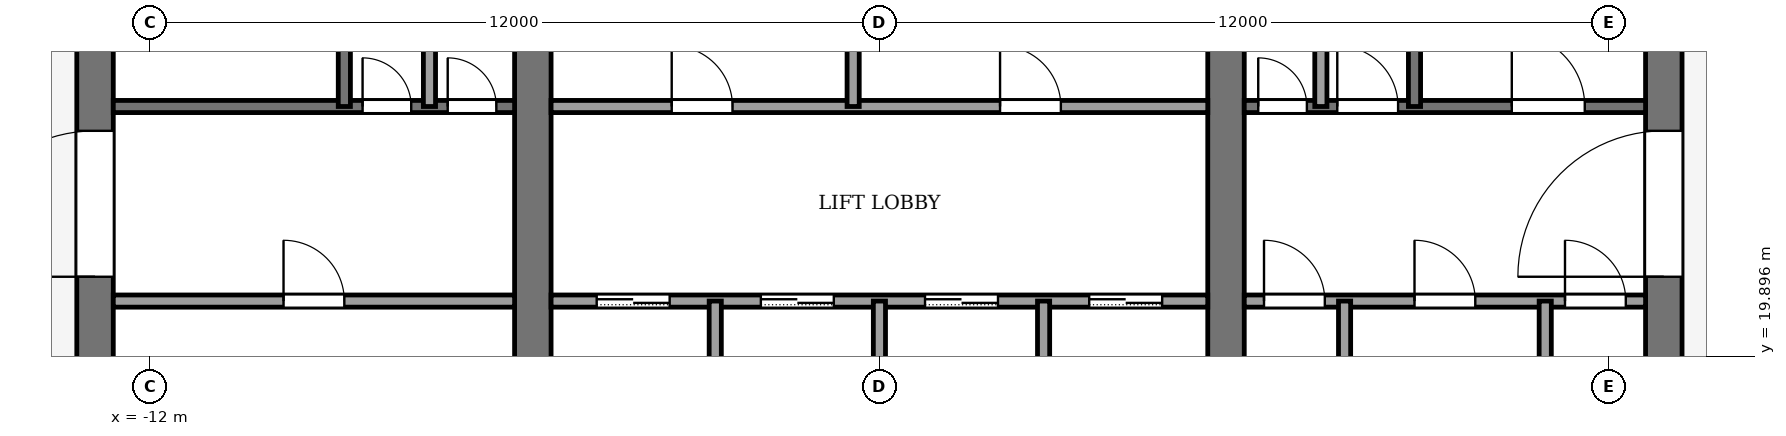
"""IFC4 building model, lengths in metres.
Left out: names, types, materials, properties, quantities, classifications, styles, units other than length and angle.
Written with IfcOpenShell. Run it as: python <this file> out.ifc"""

import sys

from ifc_helpers import new_model, si_unit, direction, frame, frame_2d, origin, place, context, subcontext, project, spatial, rectangle, extrude, element, fill, save


model = new_model("IFC4")
c1 = context("Model", 3, precision=1e-05, world=origin(), true_north=direction((0.0, 1.0)))
c2 = subcontext(c1, "Body", "Model", "MODEL_VIEW")
j1 = project(units=[si_unit("LENGTHUNIT", "METRE"), si_unit("PLANEANGLEUNIT", "RADIAN")], contexts=[c1])
p1 = place(None, origin())
s1 = spatial("IfcSite", under=j1, at=p1, CompositionType="ELEMENT")
p2 = place(p1, origin())
s2 = spatial("IfcBuilding", under=s1, at=p2, CompositionType="ELEMENT")
p3 = place(p2, frame((0.0, 0.0, 326.0)))
s3 = spatial("IfcBuildingStorey", under=s2, at=p3, CompositionType="ELEMENT", Elevation=326.0)
p4 = place(p3, frame((-12.9, 18.4, -0.13), z_axis=(0.0, 0.0, 1.0), x_axis=(0.0, 1.0, 0.0)))
e1 = element("IfcWall", 1, at=p4, inside=s3, PredefinedType="SHEAR", context=c2, shape_type="SweptSolid", body=[
    extrude(rectangle(XDim=19.2, YDim=0.6, at=frame_2d((9.6, 0.0))), origin(), (0.0, 0.0, 1.0), 4.0),
])
p5 = place(p4, frame((2.8, 0.0, 0.13)))
e2 = element("IfcOpeningElement", 2, at=p5, cuts=e1, PredefinedType="OPENING", context=c2, shape_type="SweptSolid", body=[
    extrude(rectangle(XDim=2.4, YDim=2.4, at=frame_2d((1.2, 1.2))), frame((0.0, 0.31, 0.0), z_axis=(0.0, -1.0, 0.0), x_axis=(1.0, 0.0, 0.0)), (0.0, 0.0, 1.0), 0.62),
])
p6 = place(p4, frame((13.4, 0.0, 0.13)))
e3 = element("IfcOpeningElement", 3, at=p6, cuts=e1, PredefinedType="OPENING", context=c2, shape_type="SweptSolid", body=[
    extrude(rectangle(XDim=1.4, YDim=2.2, at=frame_2d((0.7, 1.1))), frame((0.0, 0.31, 0.0), z_axis=(0.0, -1.0, 0.0), x_axis=(1.0, 0.0, 0.0)), (0.0, 0.0, 1.0), 0.62),
])
p7 = place(p3, frame((12.9, 18.4, -0.13), z_axis=(0.0, 0.0, 1.0), x_axis=(0.0, 1.0, 0.0)))
e4 = element("IfcWall", 4, at=p7, inside=s3, PredefinedType="SHEAR", context=c2, shape_type="SweptSolid", body=[
    extrude(rectangle(XDim=19.2, YDim=0.6, at=frame_2d((9.6, 0.0))), origin(), (0.0, 0.0, 1.0), 4.0),
])
p8 = place(p7, frame((2.8, 0.0, 0.13)))
e5 = element("IfcOpeningElement", 5, at=p8, cuts=e4, PredefinedType="OPENING", context=c2, shape_type="SweptSolid", body=[
    extrude(rectangle(XDim=2.4, YDim=2.4, at=frame_2d((1.2, 1.2))), frame((0.0, 0.31, 0.0), z_axis=(0.0, -1.0, 0.0), x_axis=(1.0, 0.0, 0.0)), (0.0, 0.0, 1.0), 0.62),
])
p9 = place(p7, frame((13.3, 0.0, 0.13)))
e6 = element("IfcOpeningElement", 6, at=p9, cuts=e4, PredefinedType="OPENING", context=c2, shape_type="SweptSolid", body=[
    extrude(rectangle(XDim=2.4, YDim=2.4, at=frame_2d((1.2, 1.2))), frame((0.0, 0.31, 0.0), z_axis=(0.0, -1.0, 0.0), x_axis=(1.0, 0.0, 0.0)), (0.0, 0.0, 1.0), 0.62),
])
p10 = place(p3, frame((-5.7, 18.4, -0.13), z_axis=(0.0, 0.0, 1.0), x_axis=(0.0, 1.0, 0.0)))
e7 = element("IfcWall", 7, at=p10, inside=s3, PredefinedType="SHEAR", context=c2, shape_type="SweptSolid", body=[
    extrude(rectangle(XDim=19.2, YDim=0.6, at=frame_2d((9.6, 0.0))), origin(), (0.0, 0.0, 1.0), 4.0),
])
p11 = place(p10, frame((8.35, 0.0, 0.13)))
e8 = element("IfcOpeningElement", 8, at=p11, cuts=e7, PredefinedType="OPENING", context=c2, shape_type="SweptSolid", body=[
    extrude(rectangle(XDim=0.9, YDim=2.1, at=frame_2d((0.45, 1.05))), frame((0.0, 0.31, 0.0), z_axis=(0.0, -1.0, 0.0), x_axis=(1.0, 0.0, 0.0)), (0.0, 0.0, 1.0), 0.62),
])
p12 = place(p3, frame((5.7, 18.4, -0.13), z_axis=(0.0, 0.0, 1.0), x_axis=(0.0, 1.0, 0.0)))
e9 = element("IfcWall", 9, at=p12, inside=s3, PredefinedType="SHEAR", context=c2, shape_type="SweptSolid", body=[
    extrude(rectangle(XDim=19.2, YDim=0.6, at=frame_2d((9.6, 0.0))), origin(), (0.0, 0.0, 1.0), 4.0),
])
p13 = place(p12, frame((13.3, 0.0, 0.13)))
e10 = element("IfcOpeningElement", 10, at=p13, cuts=e9, PredefinedType="OPENING", context=c2, shape_type="SweptSolid", body=[
    extrude(rectangle(XDim=2.4, YDim=2.4, at=frame_2d((1.2, 1.2))), frame((0.0, 0.31, 0.0), z_axis=(0.0, -1.0, 0.0), x_axis=(1.0, 0.0, 0.0)), (0.0, 0.0, 1.0), 0.62),
])
p14 = place(p3, frame((-12.6, 20.8, 0.0), z_axis=(0.0, 0.0, 1.0), x_axis=(1.0, 0.0, 0.0)))
e11 = element("IfcWall", 11, at=p14, inside=s3, PredefinedType="PARTITIONING", context=c2, shape_type="SweptSolid", body=[
    extrude(rectangle(XDim=6.6, YDim=0.2, at=frame_2d((3.3, 0.0))), origin(), (0.0, 0.0, 1.0), 3.87),
])
p15 = place(p14, frame((2.8, 0.0, 0.0)))
e12 = element("IfcOpeningElement", 12, at=p15, cuts=e11, PredefinedType="OPENING", context=c2, shape_type="SweptSolid", body=[
    extrude(rectangle(XDim=1.0, YDim=2.1, at=frame_2d((0.5, 1.05))), frame((0.0, 0.11, 0.0), z_axis=(0.0, -1.0, 0.0), x_axis=(1.0, 0.0, 0.0)), (0.0, 0.0, 1.0), 0.22),
])
p16 = place(p3, frame((-5.4, 20.8, 0.0), z_axis=(0.0, 0.0, 1.0), x_axis=(1.0, 0.0, 0.0)))
e13 = element("IfcWall", 13, at=p16, inside=s3, PredefinedType="PARTITIONING", context=c2, shape_type="SweptSolid", body=[
    extrude(rectangle(XDim=10.8, YDim=0.2, at=frame_2d((5.4, 0.0))), origin(), (0.0, 0.0, 1.0), 3.87),
])
p17 = place(p16, frame((0.75, 0.0, 0.0)))
e14 = element("IfcOpeningElement", 14, at=p17, cuts=e13, PredefinedType="OPENING", context=c2, shape_type="SweptSolid", body=[
    extrude(rectangle(XDim=1.2, YDim=2.2, at=frame_2d((0.6, 1.1))), frame((0.0, 0.11, 0.0), z_axis=(0.0, -1.0, 0.0), x_axis=(1.0, 0.0, 0.0)), (0.0, 0.0, 1.0), 0.22),
])
p18 = place(p16, frame((3.45, 0.0, 0.0)))
e15 = element("IfcOpeningElement", 15, at=p18, cuts=e13, PredefinedType="OPENING", context=c2, shape_type="SweptSolid", body=[
    extrude(rectangle(XDim=1.2, YDim=2.2, at=frame_2d((0.6, 1.1))), frame((0.0, 0.11, 0.0), z_axis=(0.0, -1.0, 0.0), x_axis=(1.0, 0.0, 0.0)), (0.0, 0.0, 1.0), 0.22),
])
p19 = place(p16, frame((6.15, 0.0, 0.0)))
e16 = element("IfcOpeningElement", 16, at=p19, cuts=e13, PredefinedType="OPENING", context=c2, shape_type="SweptSolid", body=[
    extrude(rectangle(XDim=1.2, YDim=2.2, at=frame_2d((0.6, 1.1))), frame((0.0, 0.11, 0.0), z_axis=(0.0, -1.0, 0.0), x_axis=(1.0, 0.0, 0.0)), (0.0, 0.0, 1.0), 0.22),
])
p20 = place(p16, frame((8.85, 0.0, 0.0)))
e17 = element("IfcOpeningElement", 17, at=p20, cuts=e13, PredefinedType="OPENING", context=c2, shape_type="SweptSolid", body=[
    extrude(rectangle(XDim=1.2, YDim=2.2, at=frame_2d((0.6, 1.1))), frame((0.0, 0.11, 0.0), z_axis=(0.0, -1.0, 0.0), x_axis=(1.0, 0.0, 0.0)), (0.0, 0.0, 1.0), 0.22),
])
p21 = place(p3, frame((6.0, 20.8, 0.0), z_axis=(0.0, 0.0, 1.0), x_axis=(1.0, 0.0, 0.0)))
e18 = element("IfcWall", 18, at=p21, inside=s3, PredefinedType="PARTITIONING", context=c2, shape_type="SweptSolid", body=[
    extrude(rectangle(XDim=6.6, YDim=0.2, at=frame_2d((3.3, 0.0))), origin(), (0.0, 0.0, 1.0), 3.87),
])
p22 = place(p21, frame((0.325, 0.0, 0.0)))
e19 = element("IfcOpeningElement", 19, at=p22, cuts=e18, PredefinedType="OPENING", context=c2, shape_type="SweptSolid", body=[
    extrude(rectangle(XDim=1.0, YDim=2.1, at=frame_2d((0.5, 1.05))), frame((0.0, 0.11, 0.0), z_axis=(0.0, -1.0, 0.0), x_axis=(1.0, 0.0, 0.0)), (0.0, 0.0, 1.0), 0.22),
])
p23 = place(p21, frame((2.8, 0.0, 0.0)))
e20 = element("IfcOpeningElement", 20, at=p23, cuts=e18, PredefinedType="OPENING", context=c2, shape_type="SweptSolid", body=[
    extrude(rectangle(XDim=1.0, YDim=2.1, at=frame_2d((0.5, 1.05))), frame((0.0, 0.11, 0.0), z_axis=(0.0, -1.0, 0.0), x_axis=(1.0, 0.0, 0.0)), (0.0, 0.0, 1.0), 0.22),
])
p24 = place(p21, frame((5.275, 0.0, 0.0)))
e21 = element("IfcOpeningElement", 21, at=p24, cuts=e18, PredefinedType="OPENING", context=c2, shape_type="SweptSolid", body=[
    extrude(rectangle(XDim=1.0, YDim=2.1, at=frame_2d((0.5, 1.05))), frame((0.0, 0.11, 0.0), z_axis=(0.0, -1.0, 0.0), x_axis=(1.0, 0.0, 0.0)), (0.0, 0.0, 1.0), 0.22),
])
p25 = place(p3, frame((-12.6, 24.0, 0.0), z_axis=(0.0, 0.0, 1.0), x_axis=(1.0, 0.0, 0.0)))
e22 = element("IfcWall", 22, at=p25, inside=s3, PredefinedType="PARTITIONING", context=c2, shape_type="SweptSolid", body=[
    extrude(rectangle(XDim=6.6, YDim=0.2, at=frame_2d((3.3, 0.0))), origin(), (0.0, 0.0, 1.0), 3.87),
])
p26 = place(p25, frame((4.1, 0.0, 0.0)))
e23 = element("IfcOpeningElement", 23, at=p26, cuts=e22, PredefinedType="OPENING", context=c2, shape_type="SweptSolid", body=[
    extrude(rectangle(XDim=0.8, YDim=2.1, at=frame_2d((0.4, 1.05))), frame((0.0, 0.11, 0.0), z_axis=(0.0, -1.0, 0.0), x_axis=(1.0, 0.0, 0.0)), (0.0, 0.0, 1.0), 0.22),
])
p27 = place(p25, frame((5.5, 0.0, 0.0)))
e24 = element("IfcOpeningElement", 24, at=p27, cuts=e22, PredefinedType="OPENING", context=c2, shape_type="SweptSolid", body=[
    extrude(rectangle(XDim=0.8, YDim=2.1, at=frame_2d((0.4, 1.05))), frame((0.0, 0.11, 0.0), z_axis=(0.0, -1.0, 0.0), x_axis=(1.0, 0.0, 0.0)), (0.0, 0.0, 1.0), 0.22),
])
p28 = place(p3, frame((-5.4, 24.0, 0.0), z_axis=(0.0, 0.0, 1.0), x_axis=(1.0, 0.0, 0.0)))
e25 = element("IfcWall", 25, at=p28, inside=s3, PredefinedType="PARTITIONING", context=c2, shape_type="SweptSolid", body=[
    extrude(rectangle(XDim=10.8, YDim=0.2, at=frame_2d((5.4, 0.0))), origin(), (0.0, 0.0, 1.0), 3.87),
])
p29 = place(p28, frame((1.984, 0.0, 0.0)))
e26 = element("IfcOpeningElement", 26, at=p29, cuts=e25, PredefinedType="OPENING", context=c2, shape_type="SweptSolid", body=[
    extrude(rectangle(XDim=1.0, YDim=2.1, at=frame_2d((0.5, 1.05))), frame((0.0, 0.11, 0.0), z_axis=(0.0, -1.0, 0.0), x_axis=(1.0, 0.0, 0.0)), (0.0, 0.0, 1.0), 0.22),
])
p30 = place(p28, frame((7.384, 0.0, 0.0)))
e27 = element("IfcOpeningElement", 27, at=p30, cuts=e25, PredefinedType="OPENING", context=c2, shape_type="SweptSolid", body=[
    extrude(rectangle(XDim=1.0, YDim=2.1, at=frame_2d((0.5, 1.05))), frame((0.0, 0.11, 0.0), z_axis=(0.0, -1.0, 0.0), x_axis=(1.0, 0.0, 0.0)), (0.0, 0.0, 1.0), 0.22),
])
p31 = place(p3, frame((6.0, 24.0, 0.0), z_axis=(0.0, 0.0, 1.0), x_axis=(1.0, 0.0, 0.0)))
e28 = element("IfcWall", 28, at=p31, inside=s3, PredefinedType="PARTITIONING", context=c2, shape_type="SweptSolid", body=[
    extrude(rectangle(XDim=6.6, YDim=0.2, at=frame_2d((3.3, 0.0))), origin(), (0.0, 0.0, 1.0), 3.87),
])
p32 = place(p31, frame((0.23, 0.0, 0.0)))
e29 = element("IfcOpeningElement", 29, at=p32, cuts=e28, PredefinedType="OPENING", context=c2, shape_type="SweptSolid", body=[
    extrude(rectangle(XDim=0.8, YDim=2.1, at=frame_2d((0.4, 1.05))), frame((0.0, 0.11, 0.0), z_axis=(0.0, -1.0, 0.0), x_axis=(1.0, 0.0, 0.0)), (0.0, 0.0, 1.0), 0.22),
])
p33 = place(p31, frame((1.53, 0.0, 0.0)))
e30 = element("IfcOpeningElement", 30, at=p33, cuts=e28, PredefinedType="OPENING", context=c2, shape_type="SweptSolid", body=[
    extrude(rectangle(XDim=1.0, YDim=2.1, at=frame_2d((0.5, 1.05))), frame((0.0, 0.11, 0.0), z_axis=(0.0, -1.0, 0.0), x_axis=(1.0, 0.0, 0.0)), (0.0, 0.0, 1.0), 0.22),
])
p34 = place(p31, frame((4.4, 0.0, 0.0)))
e31 = element("IfcOpeningElement", 31, at=p34, cuts=e28, PredefinedType="OPENING", context=c2, shape_type="SweptSolid", body=[
    extrude(rectangle(XDim=1.2, YDim=2.2, at=frame_2d((0.6, 1.1))), frame((0.0, 0.11, 0.0), z_axis=(0.0, -1.0, 0.0), x_axis=(1.0, 0.0, 0.0)), (0.0, 0.0, 1.0), 0.22),
])
for number, where, z_axis, x_axis in (
    (32, (-8.8, 24.0, 0.0), (0.0, 0.0, 1.0), (0.0, 1.0, 0.0)),
    (33, (-7.4, 24.0, 0.0), (0.0, 0.0, 1.0), (0.0, 1.0, 0.0)),
):
    element("IfcWall", number, at=place(p3, frame(where, z_axis=z_axis, x_axis=x_axis)), inside=s3, PredefinedType="PARTITIONING", context=c2, shape_type="SweptSolid", body=[
        extrude(rectangle(XDim=7.4, YDim=0.2, at=frame_2d((3.7, 0.0))), origin(), (0.0, 0.0, 1.0), 3.87),
    ])
p35 = place(p3, frame((-2.7, 18.4, 0.0), z_axis=(0.0, 0.0, 1.0), x_axis=(0.0, 1.0, 0.0)))
e34 = element("IfcWall", 34, at=p35, inside=s3, PredefinedType="PARTITIONING", context=c2, shape_type="SweptSolid", body=[
    extrude(rectangle(XDim=2.4, YDim=0.2, at=frame_2d((1.2, 0.0))), origin(), (0.0, 0.0, 1.0), 3.87),
])
p36 = place(p3, frame((-0.432, 24.0, 0.0), z_axis=(0.0, 0.0, 1.0), x_axis=(0.0, 1.0, 0.0)))
e35 = element("IfcWall", 35, at=p36, inside=s3, PredefinedType="PARTITIONING", context=c2, shape_type="SweptSolid", body=[
    extrude(rectangle(XDim=2.4, YDim=0.2, at=frame_2d((1.2, 0.0))), origin(), (0.0, 0.0, 1.0), 3.87),
])
for number, where, z_axis, x_axis in (
    (36, (0.0, 18.4, 0.0), (0.0, 0.0, 1.0), (0.0, 1.0, 0.0)),
    (37, (2.7, 18.4, 0.0), (0.0, 0.0, 1.0), (0.0, 1.0, 0.0)),
):
    element("IfcWall", number, at=place(p3, frame(where, z_axis=z_axis, x_axis=x_axis)), inside=s3, PredefinedType="PARTITIONING", context=c2, shape_type="SweptSolid", body=[
        extrude(rectangle(XDim=2.4, YDim=0.2, at=frame_2d((1.2, 0.0))), origin(), (0.0, 0.0, 1.0), 3.87),
    ])
p37 = place(p3, frame((7.26, 24.0, 0.0), z_axis=(0.0, 0.0, 1.0), x_axis=(0.0, 1.0, 0.0)))
e38 = element("IfcWall", 38, at=p37, inside=s3, PredefinedType="PARTITIONING", context=c2, shape_type="SweptSolid", body=[
    extrude(rectangle(XDim=7.4, YDim=0.2, at=frame_2d((3.7, 0.0))), origin(), (0.0, 0.0, 1.0), 3.87),
])
p38 = place(p3, frame((7.65, 18.4, 0.0), z_axis=(0.0, 0.0, 1.0), x_axis=(0.0, 1.0, 0.0)))
e39 = element("IfcWall", 39, at=p38, inside=s3, PredefinedType="PARTITIONING", context=c2, shape_type="SweptSolid", body=[
    extrude(rectangle(XDim=2.4, YDim=0.2, at=frame_2d((1.2, 0.0))), origin(), (0.0, 0.0, 1.0), 3.87),
])
p39 = place(p3, frame((8.8, 24.0, 0.0), z_axis=(0.0, 0.0, 1.0), x_axis=(0.0, 1.0, 0.0)))
e40 = element("IfcWall", 40, at=p39, inside=s3, PredefinedType="PARTITIONING", context=c2, shape_type="SweptSolid", body=[
    extrude(rectangle(XDim=7.4, YDim=0.2, at=frame_2d((3.7, 0.0))), origin(), (0.0, 0.0, 1.0), 3.87),
])
p40 = place(p3, frame((10.95, 18.4, 0.0), z_axis=(0.0, 0.0, 1.0), x_axis=(0.0, 1.0, 0.0)))
e41 = element("IfcWall", 41, at=p40, inside=s3, PredefinedType="PARTITIONING", context=c2, shape_type="SweptSolid", body=[
    extrude(rectangle(XDim=2.4, YDim=0.2, at=frame_2d((1.2, 0.0))), origin(), (0.0, 0.0, 1.0), 3.87),
])
p41 = place(p17, origin())
e42 = element("IfcDoor", 42, at=p41, inside=s3, OperationType="SLIDING_TO_LEFT", PredefinedType="DOOR", context=c2, shape_type="SweptSolid", body=[
    extrude(rectangle(XDim=1.2, YDim=2.2, at=frame_2d((0.6, 1.1))), frame((0.0, 0.025, 0.0), z_axis=(0.0, -1.0, 0.0), x_axis=(1.0, 0.0, 0.0)), (0.0, 0.0, 1.0), 0.05),
])
fill(e14, e42)
p42 = place(p18, origin())
e43 = element("IfcDoor", 43, at=p42, inside=s3, OperationType="SLIDING_TO_LEFT", PredefinedType="DOOR", context=c2, shape_type="SweptSolid", body=[
    extrude(rectangle(XDim=1.2, YDim=2.2, at=frame_2d((0.6, 1.1))), frame((0.0, 0.025, 0.0), z_axis=(0.0, -1.0, 0.0), x_axis=(1.0, 0.0, 0.0)), (0.0, 0.0, 1.0), 0.05),
])
fill(e15, e43)
p43 = place(p19, origin())
e44 = element("IfcDoor", 44, at=p43, inside=s3, OperationType="SLIDING_TO_LEFT", PredefinedType="DOOR", context=c2, shape_type="SweptSolid", body=[
    extrude(rectangle(XDim=1.2, YDim=2.2, at=frame_2d((0.6, 1.1))), frame((0.0, 0.025, 0.0), z_axis=(0.0, -1.0, 0.0), x_axis=(1.0, 0.0, 0.0)), (0.0, 0.0, 1.0), 0.05),
])
fill(e16, e44)
p44 = place(p20, origin())
e45 = element("IfcDoor", 45, at=p44, inside=s3, OperationType="SLIDING_TO_LEFT", PredefinedType="DOOR", context=c2, shape_type="SweptSolid", body=[
    extrude(rectangle(XDim=1.2, YDim=2.2, at=frame_2d((0.6, 1.1))), frame((0.0, 0.025, 0.0), z_axis=(0.0, -1.0, 0.0), x_axis=(1.0, 0.0, 0.0)), (0.0, 0.0, 1.0), 0.05),
])
fill(e17, e45)
p45 = place(p29, origin())
e46 = element("IfcDoor", 46, at=p45, inside=s3, OperationType="SINGLE_SWING_LEFT", PredefinedType="DOOR", context=c2, shape_type="SweptSolid", body=[
    extrude(rectangle(XDim=1.0, YDim=2.1, at=frame_2d((0.5, 1.05))), frame((0.0, 0.025, 0.0), z_axis=(0.0, -1.0, 0.0), x_axis=(1.0, 0.0, 0.0)), (0.0, 0.0, 1.0), 0.05),
])
fill(e26, e46)
p46 = place(p30, origin())
e47 = element("IfcDoor", 47, at=p46, inside=s3, OperationType="SINGLE_SWING_RIGHT", PredefinedType="DOOR", context=c2, shape_type="SweptSolid", body=[
    extrude(rectangle(XDim=1.0, YDim=2.1, at=frame_2d((0.5, 1.05))), frame((0.0, 0.025, 0.0), z_axis=(0.0, -1.0, 0.0), x_axis=(1.0, 0.0, 0.0)), (0.0, 0.0, 1.0), 0.05),
])
fill(e27, e47)
p47 = place(p15, origin())
e48 = element("IfcDoor", 48, at=p47, inside=s3, OperationType="SINGLE_SWING_LEFT", PredefinedType="DOOR", context=c2, shape_type="SweptSolid", body=[
    extrude(rectangle(XDim=1.0, YDim=2.1, at=frame_2d((0.5, 1.05))), frame((0.0, 0.025, 0.0), z_axis=(0.0, -1.0, 0.0), x_axis=(1.0, 0.0, 0.0)), (0.0, 0.0, 1.0), 0.05),
])
fill(e12, e48)
p48 = place(p22, origin())
e49 = element("IfcDoor", 49, at=p48, inside=s3, OperationType="SINGLE_SWING_LEFT", PredefinedType="DOOR", context=c2, shape_type="SweptSolid", body=[
    extrude(rectangle(XDim=1.0, YDim=2.1, at=frame_2d((0.5, 1.05))), frame((0.0, 0.025, 0.0), z_axis=(0.0, -1.0, 0.0), x_axis=(1.0, 0.0, 0.0)), (0.0, 0.0, 1.0), 0.05),
])
fill(e19, e49)
p49 = place(p23, origin())
e50 = element("IfcDoor", 50, at=p49, inside=s3, OperationType="SINGLE_SWING_LEFT", PredefinedType="DOOR", context=c2, shape_type="SweptSolid", body=[
    extrude(rectangle(XDim=1.0, YDim=2.1, at=frame_2d((0.5, 1.05))), frame((0.0, 0.025, 0.0), z_axis=(0.0, -1.0, 0.0), x_axis=(1.0, 0.0, 0.0)), (0.0, 0.0, 1.0), 0.05),
])
fill(e20, e50)
p50 = place(p24, origin())
e51 = element("IfcDoor", 51, at=p50, inside=s3, OperationType="SINGLE_SWING_LEFT", PredefinedType="DOOR", context=c2, shape_type="SweptSolid", body=[
    extrude(rectangle(XDim=1.0, YDim=2.1, at=frame_2d((0.5, 1.05))), frame((0.0, 0.025, 0.0), z_axis=(0.0, -1.0, 0.0), x_axis=(1.0, 0.0, 0.0)), (0.0, 0.0, 1.0), 0.05),
])
fill(e21, e51)
p51 = place(p26, origin())
e52 = element("IfcDoor", 52, at=p51, inside=s3, OperationType="SINGLE_SWING_LEFT", PredefinedType="DOOR", context=c2, shape_type="SweptSolid", body=[
    extrude(rectangle(XDim=0.8, YDim=2.1, at=frame_2d((0.4, 1.05))), frame((0.0, 0.025, 0.0), z_axis=(0.0, -1.0, 0.0), x_axis=(1.0, 0.0, 0.0)), (0.0, 0.0, 1.0), 0.05),
])
fill(e23, e52)
p52 = place(p27, origin())
e53 = element("IfcDoor", 53, at=p52, inside=s3, OperationType="SINGLE_SWING_RIGHT", PredefinedType="DOOR", context=c2, shape_type="SweptSolid", body=[
    extrude(rectangle(XDim=0.8, YDim=2.1, at=frame_2d((0.4, 1.05))), frame((0.0, 0.025, 0.0), z_axis=(0.0, -1.0, 0.0), x_axis=(1.0, 0.0, 0.0)), (0.0, 0.0, 1.0), 0.05),
])
fill(e24, e53)
p53 = place(p32, origin())
e54 = element("IfcDoor", 54, at=p53, inside=s3, OperationType="SINGLE_SWING_RIGHT", PredefinedType="DOOR", context=c2, shape_type="SweptSolid", body=[
    extrude(rectangle(XDim=0.8, YDim=2.1, at=frame_2d((0.4, 1.05))), frame((0.0, 0.025, 0.0), z_axis=(0.0, -1.0, 0.0), x_axis=(1.0, 0.0, 0.0)), (0.0, 0.0, 1.0), 0.05),
])
fill(e29, e54)
p54 = place(p33, origin())
e55 = element("IfcDoor", 55, at=p54, inside=s3, OperationType="SINGLE_SWING_LEFT", PredefinedType="DOOR", context=c2, shape_type="SweptSolid", body=[
    extrude(rectangle(XDim=1.0, YDim=2.1, at=frame_2d((0.5, 1.05))), frame((0.0, 0.025, 0.0), z_axis=(0.0, -1.0, 0.0), x_axis=(1.0, 0.0, 0.0)), (0.0, 0.0, 1.0), 0.05),
])
fill(e30, e55)
p55 = place(p34, origin())
e56 = element("IfcDoor", 56, at=p55, inside=s3, OperationType="SINGLE_SWING_LEFT", PredefinedType="DOOR", context=c2, shape_type="SweptSolid", body=[
    extrude(rectangle(XDim=1.2, YDim=2.2, at=frame_2d((0.6, 1.1))), frame((0.0, 0.025, 0.0), z_axis=(0.0, -1.0, 0.0), x_axis=(1.0, 0.0, 0.0)), (0.0, 0.0, 1.0), 0.05),
])
fill(e31, e56)
p56 = place(p5, origin())
e57 = element("IfcDoor", 57, at=p56, inside=s3, OperationType="DOUBLE_DOOR_SINGLE_SWING", PredefinedType="DOOR", context=c2, shape_type="SweptSolid", body=[
    extrude(rectangle(XDim=2.4, YDim=2.4, at=frame_2d((1.2, 1.2))), frame((0.0, 0.025, 0.0), z_axis=(0.0, -1.0, 0.0), x_axis=(1.0, 0.0, 0.0)), (0.0, 0.0, 1.0), 0.05),
])
fill(e2, e57)
p57 = place(p8, origin())
e58 = element("IfcDoor", 58, at=p57, inside=s3, OperationType="DOUBLE_DOOR_SINGLE_SWING", PredefinedType="DOOR", context=c2, shape_type="SweptSolid", body=[
    extrude(rectangle(XDim=2.4, YDim=2.4, at=frame_2d((1.2, 1.2))), frame((0.0, 0.025, 0.0), z_axis=(0.0, -1.0, 0.0), x_axis=(1.0, 0.0, 0.0)), (0.0, 0.0, 1.0), 0.05),
])
fill(e5, e58)
save(model, sys.argv[1])
